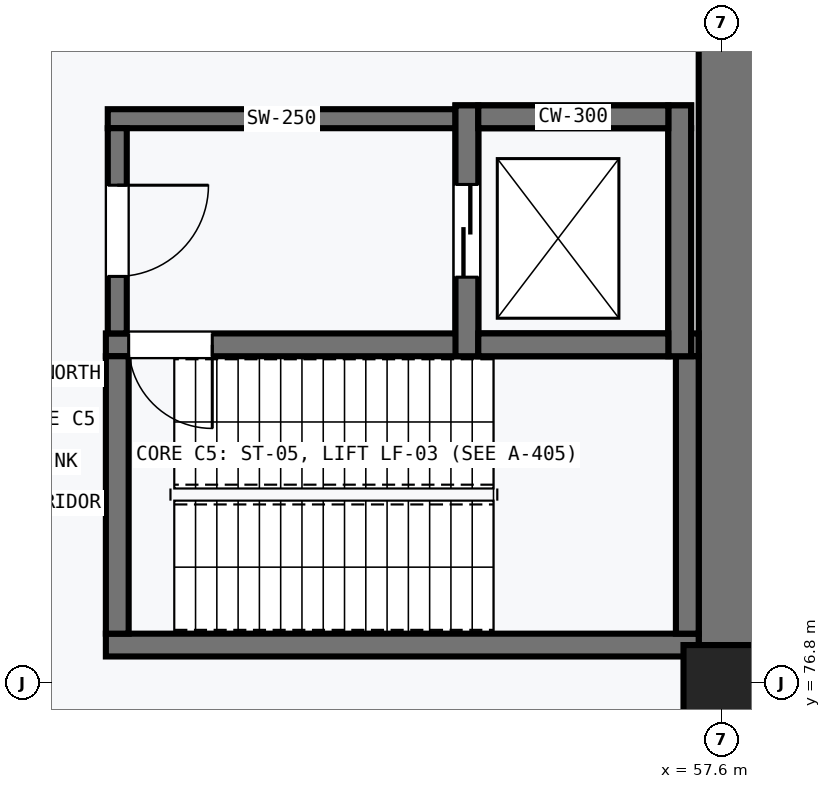
"""IFC4 building model, lengths in metres.
Left out: names, types, materials, properties, quantities, classifications, styles, units other than length and angle.
Written with IfcOpenShell. Run it as: python <this file> out.ifc"""

import sys

from ifc_helpers import new_model, si_unit, direction, frame, frame_2d, origin, origin_2d, place, context, subcontext, project, spatial, rectangle, extrude, element, fill, save


model = new_model("IFC4")
c1 = context("Model", 3, precision=1e-05, world=origin(), true_north=direction((0.0, 1.0)))
c2 = subcontext(c1, "Body", "Model", "MODEL_VIEW")
j1 = project(units=[si_unit("LENGTHUNIT", "METRE"), si_unit("PLANEANGLEUNIT", "RADIAN")], contexts=[c1])
p1 = place(None, origin())
s1 = spatial("IfcSite", under=j1, at=p1, CompositionType="ELEMENT")
p2 = place(p1, origin())
s2 = spatial("IfcBuilding", under=s1, at=p2, CompositionType="ELEMENT")
p3 = place(p2, frame((0.0, 0.0, -10.8)))
s3 = spatial("IfcBuildingStorey", under=s2, at=p3, CompositionType="ELEMENT", Elevation=-10.8)
p4 = place(p3, frame((57.7, 86.5, 0.0), z_axis=(0.0, 0.0, 1.0), x_axis=(0.0, -1.0, 0.0)))
e1 = element("IfcWall", 1, at=p4, inside=s3, PredefinedType="SOLIDWALL", context=c2, shape_type="SweptSolid", body=[
    extrude(rectangle(XDim=9.6, YDim=0.8, at=frame_2d((4.8, 0.0))), origin(), (0.0, 0.0, 1.0), 5.05),
])
p5 = place(p3, frame((57.7, 76.9, 0.0), z_axis=(0.0, 0.0, 1.0), x_axis=(1.0, 0.0, 0.0)))
e2 = element("IfcWall", 2, at=p5, inside=s3, PredefinedType="SOLIDWALL", context=c2, shape_type="SweptSolid", body=[
    extrude(rectangle(XDim=96.0, YDim=0.8, at=frame_2d((48.0, 0.0))), origin(), (0.0, 0.0, 1.0), 5.05),
])
p6 = place(p3, frame((57.6, 76.8, 0.0), z_axis=(0.0, 0.0, 1.0), x_axis=(1.0, 0.0, 0.0)))
e3 = element("IfcColumn", 3, at=p6, inside=s3, PredefinedType="COLUMN", context=c2, shape_type="SweptSolid", body=[
    extrude(rectangle(XDim=1.0, YDim=1.0, at=origin_2d()), origin(), (0.0, 0.0, 1.0), 5.05),
])
p7 = place(p3, frame((49.5, 77.3, 0.0), z_axis=(0.0, 0.0, 1.0), x_axis=(1.0, 0.0, 0.0)))
e4 = element("IfcWall", 4, at=p7, inside=s3, PredefinedType="SHEAR", context=c2, shape_type="SweptSolid", body=[
    extrude(rectangle(XDim=7.8, YDim=0.3, at=frame_2d((3.9, 0.0))), origin(), (0.0, 0.0, 1.0), 5.05),
])
p8 = place(p3, frame((57.3, 81.25, 0.0), z_axis=(0.0, 0.0, 1.0), x_axis=(-1.0, 0.0, 0.0)))
e5 = element("IfcWall", 5, at=p8, inside=s3, PredefinedType="SHEAR", context=c2, shape_type="SweptSolid", body=[
    extrude(rectangle(XDim=7.8, YDim=0.3, at=frame_2d((3.9, 0.0))), origin(), (0.0, 0.0, 1.0), 5.05),
])
p9 = place(p8, frame((6.4, 0.0, 0.0)))
e6 = element("IfcOpeningElement", 6, at=p9, cuts=e5, PredefinedType="OPENING", context=c2, shape_type="SweptSolid", body=[
    extrude(rectangle(XDim=1.1, YDim=2.15, at=frame_2d((0.55, 1.075))), frame((0.0, 0.16, 0.0), z_axis=(0.0, -1.0, 0.0), x_axis=(1.0, 0.0, 0.0)), (0.0, 0.0, 1.0), 0.32),
])
for number, where, z_axis, x_axis in (
    (7, (49.65, 77.45, 0.0), (0.0, 0.0, 1.0), (0.0, 1.0, 0.0)),
    (8, (57.15, 81.1, 0.0), (0.0, 0.0, 1.0), (0.0, -1.0, 0.0)),
):
    element("IfcWall", number, at=place(p3, frame(where, z_axis=z_axis, x_axis=x_axis)), inside=s3, PredefinedType="SHEAR", context=c2, shape_type="SweptSolid", body=[
        extrude(rectangle(XDim=3.65, YDim=0.3, at=frame_2d((1.825, 0.0))), origin(), (0.0, 0.0, 1.0), 5.05),
    ])
p10 = place(p3, frame((54.25, 84.1, 0.0), z_axis=(0.0, 0.0, 1.0), x_axis=(0.0, -1.0, 0.0)))
e9 = element("IfcWall", 9, at=p10, inside=s3, PredefinedType="SHEAR", context=c2, shape_type="SweptSolid", body=[
    extrude(rectangle(XDim=2.7, YDim=0.3, at=frame_2d((1.35, 0.0))), origin(), (0.0, 0.0, 1.0), 5.05),
])
p11 = place(p10, frame((0.74, 0.0, 0.0)))
e10 = element("IfcOpeningElement", 10, at=p11, cuts=e9, PredefinedType="OPENING", context=c2, shape_type="SweptSolid", body=[
    extrude(rectangle(XDim=1.22, YDim=2.15, at=frame_2d((0.61, 1.075))), frame((0.0, 0.16, 0.0), z_axis=(0.0, -1.0, 0.0), x_axis=(1.0, 0.0, 0.0)), (0.0, 0.0, 1.0), 0.32),
])
p12 = place(p3, frame((57.05, 81.4, 0.0), z_axis=(0.0, 0.0, 1.0), x_axis=(0.0, 1.0, 0.0)))
e11 = element("IfcWall", 11, at=p12, inside=s3, PredefinedType="SHEAR", context=c2, shape_type="SweptSolid", body=[
    extrude(rectangle(XDim=2.7, YDim=0.3, at=frame_2d((1.35, 0.0))), origin(), (0.0, 0.0, 1.0), 5.05),
])
p13 = place(p3, frame((54.1, 84.25, 0.0), z_axis=(0.0, 0.0, 1.0), x_axis=(1.0, 0.0, 0.0)))
e12 = element("IfcWall", 12, at=p13, inside=s3, PredefinedType="SHEAR", context=c2, shape_type="SweptSolid", body=[
    extrude(rectangle(XDim=3.1, YDim=0.3, at=frame_2d((1.55, 0.0))), origin(), (0.0, 0.0, 1.0), 5.05),
])
p14 = place(p3, frame((54.1, 84.225, 0.0), z_axis=(0.0, 0.0, 1.0), x_axis=(-1.0, 0.0, 0.0)))
e13 = element("IfcWall", 13, at=p14, inside=s3, PredefinedType="SHEAR", context=c2, shape_type="SweptSolid", body=[
    extrude(rectangle(XDim=4.575, YDim=0.25, at=frame_2d((2.288, 0.0))), origin(), (0.0, 0.0, 1.0), 5.05),
])
p15 = place(p3, frame((49.65, 81.4, 0.0), z_axis=(0.0, 0.0, 1.0), x_axis=(0.0, 1.0, 0.0)))
e14 = element("IfcWall", 14, at=p15, inside=s3, PredefinedType="SHEAR", context=c2, shape_type="SweptSolid", body=[
    extrude(rectangle(XDim=2.7, YDim=0.25, at=frame_2d((1.35, 0.0))), origin(), (0.0, 0.0, 1.0), 5.05),
])
p16 = place(p15, frame((0.75, 0.0, 0.0)))
e15 = element("IfcOpeningElement", 15, at=p16, cuts=e14, PredefinedType="OPENING", context=c2, shape_type="SweptSolid", body=[
    extrude(rectangle(XDim=1.2, YDim=2.15, at=frame_2d((0.6, 1.075))), frame((0.0, 0.135, 0.0), z_axis=(0.0, -1.0, 0.0), x_axis=(1.0, 0.0, 0.0)), (0.0, 0.0, 1.0), 0.27),
])
for number, where, z_axis, x_axis in (
    (16, (54.25, 81.1, -1.2), (0.0, 0.0, 1.0), (0.0, 1.0, 0.0)),
    (17, (57.05, 81.1, -1.2), (0.0, 0.0, 1.0), (0.0, 1.0, 0.0)),
):
    element("IfcWall", number, at=place(p3, frame(where, z_axis=z_axis, x_axis=x_axis)), inside=s3, PredefinedType="SHEAR", context=c2, shape_type="SweptSolid", body=[
        extrude(rectangle(XDim=3.3, YDim=0.3, at=frame_2d((1.65, 0.0))), origin(), (0.0, 0.0, 1.0), 0.32),
    ])
for number, where, z_axis, x_axis in (
    (18, (54.4, 81.25, -1.2), (0.0, 0.0, 1.0), (1.0, 0.0, 0.0)),
    (19, (54.4, 84.25, -1.2), (0.0, 0.0, 1.0), (1.0, 0.0, 0.0)),
):
    element("IfcWall", number, at=place(p3, frame(where, z_axis=z_axis, x_axis=x_axis)), inside=s3, PredefinedType="SHEAR", context=c2, shape_type="SweptSolid", body=[
        extrude(rectangle(XDim=2.5, YDim=0.3, at=frame_2d((1.25, 0.0))), origin(), (0.0, 0.0, 1.0), 0.32),
    ])
p17 = place(p9, origin())
e20 = element("IfcDoor", 20, at=p17, inside=s3, OperationType="SINGLE_SWING_LEFT", PredefinedType="DOOR", context=c2, shape_type="SweptSolid", body=[
    extrude(rectangle(XDim=1.1, YDim=2.15, at=frame_2d((0.55, 1.075))), frame((0.0, 0.025, 0.0), z_axis=(0.0, -1.0, 0.0), x_axis=(1.0, 0.0, 0.0)), (0.0, 0.0, 1.0), 0.05),
])
fill(e6, e20)
p18 = place(p11, frame((1.22, 0.0, 0.0), z_axis=(0.0, 0.0, 1.0), x_axis=(-1.0, 0.0, 0.0)))
e21 = element("IfcDoor", 21, at=p18, inside=s3, OperationType="DOUBLE_DOOR_SLIDING", PredefinedType="DOOR", context=c2, shape_type="SweptSolid", body=[
    extrude(rectangle(XDim=1.22, YDim=2.15, at=frame_2d((0.61, 1.075))), frame((0.0, 0.025, 0.0), z_axis=(0.0, -1.0, 0.0), x_axis=(1.0, 0.0, 0.0)), (0.0, 0.0, 1.0), 0.05),
])
fill(e10, e21)
p19 = place(p16, frame((1.2, 0.0, 0.0), z_axis=(0.0, 0.0, 1.0), x_axis=(-1.0, 0.0, 0.0)))
e22 = element("IfcDoor", 22, at=p19, inside=s3, OperationType="SINGLE_SWING_RIGHT", PredefinedType="DOOR", context=c2, shape_type="SweptSolid", body=[
    extrude(rectangle(XDim=1.2, YDim=2.15, at=frame_2d((0.6, 1.075))), frame((0.0, 0.025, 0.0), z_axis=(0.0, -1.0, 0.0), x_axis=(1.0, 0.0, 0.0)), (0.0, 0.0, 1.0), 0.05),
])
fill(e15, e22)
save(model, sys.argv[1])
